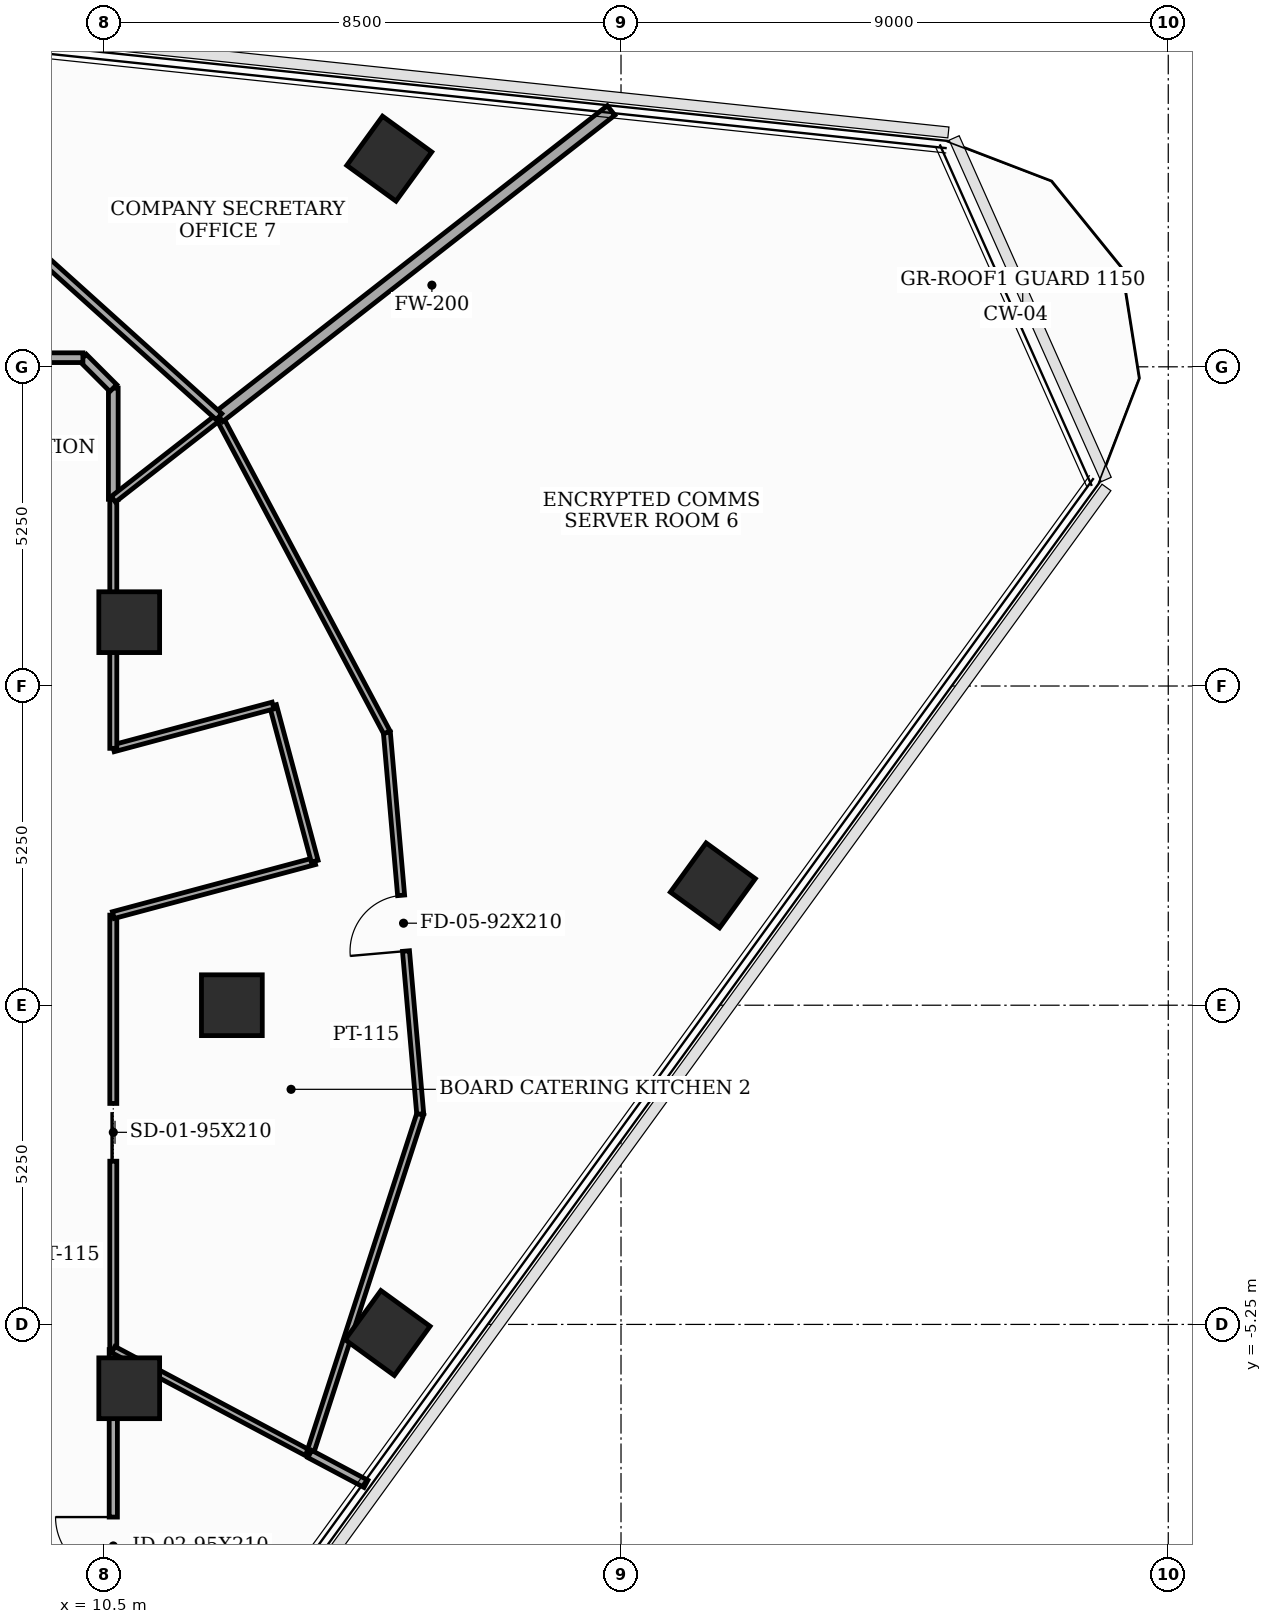
"""IFC4 building model, lengths in metres.
Left out: names, types, materials, properties, quantities, classifications, styles, units other than length and angle.
Written with IfcOpenShell. Run it as: python <this file> out.ifc"""

import sys

from ifc_helpers import new_model, si_unit, direction, frame, frame_2d, origin, origin_2d, place, context, subcontext, project, spatial, rectangle, extrude, element, fill, save


model = new_model("IFC4")
c1 = context("Model", 3, precision=1e-05, world=origin(), true_north=direction((0.0, 1.0)))
c2 = subcontext(c1, "Body", "Model", "MODEL_VIEW")
j1 = project(units=[si_unit("LENGTHUNIT", "METRE"), si_unit("PLANEANGLEUNIT", "RADIAN")], contexts=[c1])
p1 = place(None, origin())
s1 = spatial("IfcSite", under=j1, at=p1, CompositionType="ELEMENT")
p2 = place(p1, origin())
s2 = spatial("IfcBuilding", under=s1, at=p2, CompositionType="ELEMENT")
p3 = place(p2, frame((0.0, 0.0, 218.9)))
s3 = spatial("IfcBuildingStorey", under=s2, at=p3, CompositionType="ELEMENT", Elevation=218.9)
for number, where, z_axis, x_axis in (
    (1, (12.6, 0.0, 0.0), (0.0, 0.0, 1.0), (1.0, 0.0, 0.0)),
    (2, (10.912, 6.3, 0.0), (0.0, 0.0, 1.0), (1.0, 0.0, 0.0)),
    (3, (10.912, -6.3, 0.0), (0.0, 0.0, 1.0), (1.0, 0.0, 0.0)),
    (4, (15.161, -5.391, 0.0), (0.0, 0.0, 1.0), (0.588, 0.809, 0.0)),
    (5, (20.51, 1.971, 0.0), (0.0, 0.0, 1.0), (0.588, 0.809, 0.0)),
    (6, (15.188, 13.923, 0.0), (0.0, 0.0, 1.0), (0.588, 0.809, 0.0)),
):
    element("IfcColumn", number, at=place(p3, frame(where, z_axis=z_axis, x_axis=x_axis)), inside=s3, PredefinedType="COLUMN", context=c2, shape_type="SweptSolid", body=[
        extrude(rectangle(XDim=1.0, YDim=1.0, at=origin_2d()), origin(), (0.0, 0.0, 1.0), 3.7),
    ])
p4 = place(p3, frame((10.65, -5.663, 0.0), z_axis=(0.0, 0.0, 1.0), x_axis=(0.0, 1.0, 0.0)))
e7 = element("IfcWall", 7, at=p4, inside=s3, PredefinedType="PARTITIONING", context=c2, shape_type="SweptSolid", body=[
    extrude(rectangle(XDim=7.145, YDim=0.115, at=frame_2d((3.573, 0.0))), origin(), (0.0, 0.0, 1.0), 2.885),
])
p5 = place(p4, frame((3.097, 0.0, 0.0)))
e8 = element("IfcOpeningElement", 8, at=p5, cuts=e7, PredefinedType="OPENING", context=c2, shape_type="SweptSolid", body=[
    extrude(rectangle(XDim=0.95, YDim=2.1, at=frame_2d((0.475, 1.05))), frame((0.0, 0.067, 0.0), z_axis=(0.0, -1.0, 0.0), x_axis=(1.0, 0.0, 0.0)), (0.0, 0.0, 1.0), 0.135),
])
p6 = place(p3, frame((10.65, 1.482, 0.0), z_axis=(0.0, 0.0, 1.0), x_axis=(0.965961397105, 0.2586862565, 0.0)))
e9 = element("IfcWall", 9, at=p6, inside=s3, PredefinedType="PARTITIONING", context=c2, shape_type="SweptSolid", body=[
    extrude(rectangle(XDim=3.429, YDim=0.115, at=frame_2d((1.714, 0.0))), origin(), (0.0, 0.0, 1.0), 2.885),
])
p7 = place(p3, frame((13.962, 2.369, 0.0), z_axis=(0.0, 0.0, 1.0), x_axis=(-0.258413725385, 0.966034340245, 0.0)))
e10 = element("IfcWall", 10, at=p7, inside=s3, PredefinedType="PARTITIONING", context=c2, shape_type="SweptSolid", body=[
    extrude(rectangle(XDim=2.65, YDim=0.115, at=frame_2d((1.325, 0.0))), origin(), (0.0, 0.0, 1.0), 3.5),
])
p8 = place(p3, frame((13.277, 4.929, 0.0), z_axis=(0.0, 0.0, 1.0), x_axis=(-0.965934830229, -0.258785439601, 0.0)))
e11 = element("IfcWall", 11, at=p8, inside=s3, PredefinedType="PARTITIONING", context=c2, shape_type="SweptSolid", body=[
    extrude(rectangle(XDim=2.72, YDim=0.115, at=frame_2d((1.36, 0.0))), origin(), (0.0, 0.0, 1.0), 2.885),
])
p9 = place(p3, frame((10.65, 4.225, 0.0), z_axis=(0.0, 0.0, 1.0), x_axis=(0.0, 1.0, 0.0)))
e12 = element("IfcWall", 12, at=p9, inside=s3, PredefinedType="PARTITIONING", context=c2, shape_type="SweptSolid", body=[
    extrude(rectangle(XDim=4.096, YDim=0.115, at=frame_2d((2.048, 0.0))), origin(), (0.0, 0.0, 1.0), 2.885),
])
p10 = place(p3, frame((10.65, -10.15, 0.0), z_axis=(0.0, 0.0, 1.0), x_axis=(0.0, 1.0, 0.0)))
e13 = element("IfcWall", 13, at=p10, inside=s3, PredefinedType="PARTITIONING", context=c2, shape_type="SweptSolid", body=[
    extrude(rectangle(XDim=4.487, YDim=0.135, at=frame_2d((2.243, 0.0))), origin(), (0.0, 0.0, 1.0), 2.885),
])
p11 = place(p10, frame((0.781, 0.0, 0.0)))
e14 = element("IfcOpeningElement", 14, at=p11, cuts=e13, PredefinedType="OPENING", context=c2, shape_type="SweptSolid", body=[
    extrude(rectangle(XDim=0.95, YDim=2.1, at=frame_2d((0.475, 1.05))), frame((0.0, 0.077, 0.0), z_axis=(0.0, -1.0, 0.0), x_axis=(1.0, 0.0, 0.0)), (0.0, 0.0, 1.0), 0.155),
])
p12 = place(p3, frame((10.65, 8.321, 0.0), z_axis=(0.0, 0.0, 1.0), x_axis=(0.0, 1.0, 0.0)))
e15 = element("IfcWall", 15, at=p12, inside=s3, PredefinedType="PARTITIONING", context=c2, shape_type="SweptSolid", body=[
    extrude(rectangle(XDim=1.829, YDim=0.16, at=frame_2d((0.915, 0.0))), origin(), (0.0, 0.0, 1.0), 3.5),
])
p13 = place(p3, frame((10.65, 10.15, 0.0), z_axis=(0.0, 0.0, 1.0), x_axis=(-0.707106781187, 0.707106781187, 0.0)))
e16 = element("IfcWall", 16, at=p13, inside=s3, PredefinedType="PARTITIONING", context=c2, shape_type="SweptSolid", body=[
    extrude(rectangle(XDim=0.707, YDim=0.16, at=frame_2d((0.354, 0.0))), origin(), (0.0, 0.0, 1.0), 3.5),
])
p14 = place(p3, frame((10.15, 10.65, 0.0), z_axis=(0.0, 0.0, 1.0), x_axis=(-1.0, 0.0, 0.0)))
e17 = element("IfcWall", 17, at=p14, inside=s3, PredefinedType="PARTITIONING", context=c2, shape_type="SweptSolid", body=[
    extrude(rectangle(XDim=11.3, YDim=0.16, at=frame_2d((5.65, 0.0))), origin(), (0.0, 0.0, 1.0), 2.885),
])
p15 = place(p14, frame((6.506, 0.0, 0.0)))
e18 = element("IfcOpeningElement", 18, at=p15, cuts=e17, PredefinedType="OPENING", context=c2, shape_type="SweptSolid", body=[
    extrude(rectangle(XDim=1.0, YDim=2.15, at=frame_2d((0.5, 1.075))), frame((0.0, 0.09, 0.0), z_axis=(0.0, -1.0, 0.0), x_axis=(1.0, 0.0, 0.0)), (0.0, 0.0, 1.0), 0.18),
])
p16 = place(p3, frame((10.65, -5.663, 0.0), z_axis=(0.0, 0.0, 1.0), x_axis=(0.882952413676, -0.469462496036, 0.0)))
e19 = element("IfcWall", 19, at=p16, inside=s3, PredefinedType="PARTITIONING", context=c2, shape_type="SweptSolid", body=[
    extrude(rectangle(XDim=3.659, YDim=0.115, at=frame_2d((1.83, 0.0))), origin(), (0.0, 0.0, 1.0), 2.885),
])
p17 = place(p3, frame((13.881, -7.381, 0.0), z_axis=(0.0, 0.0, 1.0), x_axis=(0.309006266506, 0.951060001924, 0.0)))
e20 = element("IfcWall", 20, at=p17, inside=s3, PredefinedType="PARTITIONING", context=c2, shape_type="SweptSolid", body=[
    extrude(rectangle(XDim=5.88, YDim=0.115, at=frame_2d((2.94, 0.0))), origin(), (0.0, 0.0, 1.0), 2.985),
])
p18 = place(p3, frame((15.698, -1.789, 0.0), z_axis=(0.0, 0.0, 1.0), x_axis=(-0.087153009445, 0.996194937221, 0.0)))
e21 = element("IfcWall", 21, at=p18, inside=s3, PredefinedType="PARTITIONING", context=c2, shape_type="SweptSolid", body=[
    extrude(rectangle(XDim=6.3, YDim=0.115, at=frame_2d((3.15, 0.0))), origin(), (0.0, 0.0, 1.0), 2.985),
])
p19 = place(p18, frame((2.69, 0.0, 0.0)))
e22 = element("IfcOpeningElement", 22, at=p19, cuts=e21, PredefinedType="OPENING", context=c2, shape_type="SweptSolid", body=[
    extrude(rectangle(XDim=0.92, YDim=2.1, at=frame_2d((0.46, 1.05))), frame((0.0, 0.067, 0.0), z_axis=(0.0, -1.0, 0.0), x_axis=(1.0, 0.0, 0.0)), (0.0, 0.0, 1.0), 0.135),
])
p20 = place(p3, frame((15.149, 4.487, 0.0), z_axis=(0.0, 0.0, 1.0), x_axis=(-0.469396049876, 0.882987739643, 0.0)))
e23 = element("IfcWall", 23, at=p20, inside=s3, PredefinedType="PARTITIONING", context=c2, shape_type="SweptSolid", body=[
    extrude(rectangle(XDim=5.88, YDim=0.115, at=frame_2d((2.94, 0.0))), origin(), (0.0, 0.0, 1.0), 2.985),
])
p21 = place(p3, frame((12.389, 9.679, 0.0), z_axis=(0.0, 0.0, 1.0), x_axis=(-0.788177008199, -0.615448619908, 0.0)))
e24 = element("IfcWall", 24, at=p21, inside=s3, PredefinedType="PARTITIONING", context=c2, shape_type="SweptSolid", body=[
    extrude(rectangle(XDim=2.206, YDim=0.115, at=frame_2d((1.103, 0.0))), origin(), (0.0, 0.0, 1.0), 3.5),
])
p22 = place(p3, frame((14.805, -7.872, 0.0), z_axis=(0.0, 0.0, 1.0), x_axis=(-0.883242549552, 0.468916409033, 0.0)))
e25 = element("IfcWall", 25, at=p22, inside=s3, PredefinedType="PARTITIONING", context=c2, shape_type="SweptSolid", body=[
    extrude(rectangle(XDim=1.046, YDim=0.135, at=frame_2d((0.523, 0.0))), origin(), (0.0, 0.0, 1.0), 3.035),
])
p23 = place(p3, frame((18.836, 14.716, 0.0), z_axis=(0.0, 0.0, 1.0), x_axis=(-0.78799903942, -0.615676468507, 0.0)))
e26 = element("IfcWall", 26, at=p23, inside=s3, PredefinedType="SOLIDWALL", context=c2, shape_type="SweptSolid", body=[
    extrude(rectangle(XDim=8.182, YDim=0.2, at=frame_2d((4.091, 0.0))), origin(), (0.0, 0.0, 1.0), 2.985),
])
p24 = place(p3, frame((8.019, 13.614, 0.0), z_axis=(0.0, 0.0, 1.0), x_axis=(0.743110388877, -0.669168850099, 0.0)))
e27 = element("IfcWall", 27, at=p24, inside=s3, PredefinedType="PARTITIONING", context=c2, shape_type="SweptSolid", body=[
    extrude(rectangle(XDim=5.881, YDim=0.135, at=frame_2d((2.94, 0.0))), origin(), (0.0, 0.0, 1.0), 3.5),
])
p25 = place(p5, origin())
e28 = element("IfcDoor", 28, at=p25, inside=s3, OperationType="SLIDING_TO_LEFT", PredefinedType="DOOR", context=c2, shape_type="SweptSolid", body=[
    extrude(rectangle(XDim=0.95, YDim=2.1, at=frame_2d((0.475, 1.05))), frame((0.0, 0.025, 0.0), z_axis=(0.0, -1.0, 0.0), x_axis=(1.0, 0.0, 0.0)), (0.0, 0.0, 1.0), 0.05),
])
fill(e8, e28)
p26 = place(p11, origin())
e29 = element("IfcDoor", 29, at=p26, inside=s3, OperationType="SINGLE_SWING_RIGHT", PredefinedType="DOOR", context=c2, shape_type="SweptSolid", body=[
    extrude(rectangle(XDim=0.95, YDim=2.1, at=frame_2d((0.475, 1.05))), frame((0.0, 0.025, 0.0), z_axis=(0.0, -1.0, 0.0), x_axis=(1.0, 0.0, 0.0)), (0.0, 0.0, 1.0), 0.05),
])
fill(e14, e29)
p27 = place(p19, origin())
e30 = element("IfcDoor", 30, at=p27, inside=s3, OperationType="SINGLE_SWING_LEFT", PredefinedType="DOOR", context=c2, shape_type="SweptSolid", body=[
    extrude(rectangle(XDim=0.92, YDim=2.1, at=frame_2d((0.46, 1.05))), frame((0.0, 0.025, 0.0), z_axis=(0.0, -1.0, 0.0), x_axis=(1.0, 0.0, 0.0)), (0.0, 0.0, 1.0), 0.05),
])
fill(e22, e30)
save(model, sys.argv[1])
